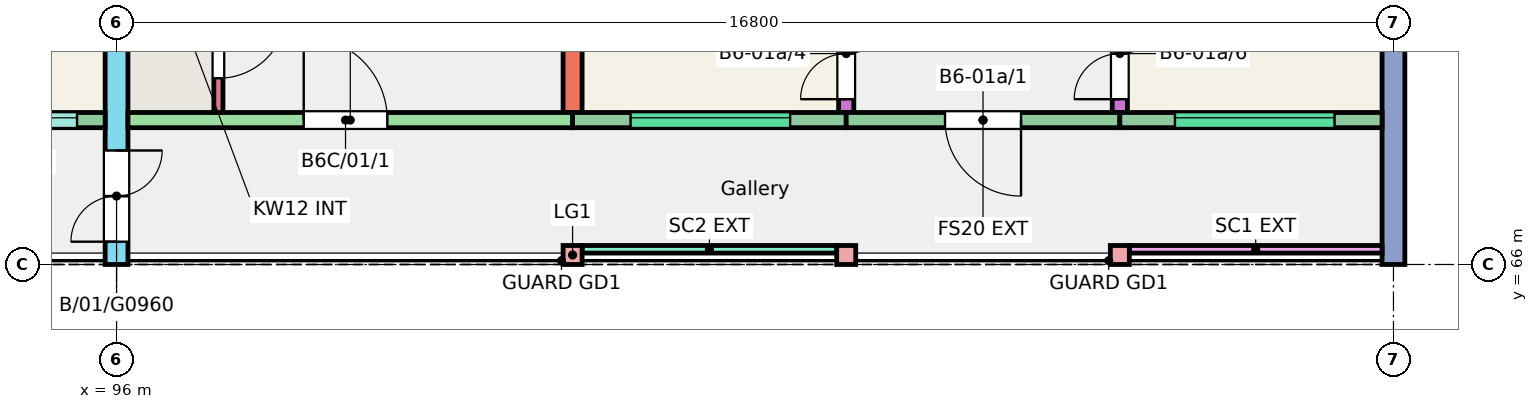
"""IFC4 building model, lengths in metres.
Left out: names, types, materials, properties, quantities, classifications, styles, units other than length and angle.
Written with IfcOpenShell. Run it as: python <this file> out.ifc"""

import sys

from ifc_helpers import new_model, si_unit, direction, frame, frame_2d, origin, origin_2d, place, context, subcontext, project, spatial, rectangle, extrude, element, fill, save


model = new_model("IFC4")
c1 = context("Model", 3, precision=1e-05, world=origin(), true_north=direction((0.0, 1.0)))
c2 = subcontext(c1, "Body", "Model", "MODEL_VIEW")
j1 = project(units=[si_unit("LENGTHUNIT", "METRE"), si_unit("PLANEANGLEUNIT", "RADIAN")], contexts=[c1])
p1 = place(None, origin())
s1 = spatial("IfcSite", under=j1, at=p1, CompositionType="ELEMENT")
p2 = place(p1, origin())
s2 = spatial("IfcBuilding", under=s1, at=p2, CompositionType="ELEMENT")
p3 = place(p2, frame((0.0, 0.0, 3.0)))
s3 = spatial("IfcBuildingStorey", under=s2, at=p3, CompositionType="ELEMENT", Elevation=3.0)
p4 = place(p3, frame((96.0, 66.0, 0.0), z_axis=(0.0, 0.0, 1.0), x_axis=(0.0, 1.0, 0.0)))
e1 = element("IfcWall", 1, at=p4, inside=s3, PredefinedType="SHEAR", context=c2, shape_type="SweptSolid", body=[
    extrude(rectangle(XDim=11.0, YDim=0.3, at=frame_2d((5.5, 0.0))), origin(), (0.0, 0.0, 1.0), 3.0),
])
p5 = place(p4, frame((0.3, 0.0, 0.0)))
e2 = element("IfcOpeningElement", 2, at=p5, cuts=e1, PredefinedType="OPENING", context=c2, shape_type="SweptSolid", body=[
    extrude(rectangle(XDim=1.2, YDim=2.1, at=frame_2d((0.6, 1.05))), frame((0.0, 0.16, 0.0), z_axis=(0.0, -1.0, 0.0), x_axis=(1.0, 0.0, 0.0)), (0.0, 0.0, 1.0), 0.32),
])
p6 = place(p3, frame((102.0, 68.0, 0.0), z_axis=(0.0, 0.0, 1.0), x_axis=(0.0, 1.0, 0.0)))
e3 = element("IfcWall", 3, at=p6, inside=s3, PredefinedType="SHEAR", context=c2, shape_type="SweptSolid", body=[
    extrude(rectangle(XDim=9.0, YDim=0.25, at=frame_2d((4.5, 0.0))), origin(), (0.0, 0.0, 1.0), 3.0),
])
p7 = place(p3, frame((105.6, 68.0, 0.0), z_axis=(0.0, 0.0, 1.0), x_axis=(0.0, 1.0, 0.0)))
e4 = element("IfcWall", 4, at=p7, inside=s3, PredefinedType="SHEAR", context=c2, shape_type="SweptSolid", body=[
    extrude(rectangle(XDim=9.0, YDim=0.2, at=frame_2d((4.5, 0.0))), origin(), (0.0, 0.0, 1.0), 3.0),
])
p8 = place(p7, frame((0.175, 0.0, 0.0)))
e5 = element("IfcOpeningElement", 5, at=p8, cuts=e4, PredefinedType="OPENING", context=c2, shape_type="SweptSolid", body=[
    extrude(rectangle(XDim=1.2, YDim=2.1, at=frame_2d((0.6, 1.05))), frame((0.0, 0.11, 0.0), z_axis=(0.0, -1.0, 0.0), x_axis=(1.0, 0.0, 0.0)), (0.0, 0.0, 1.0), 0.22),
])
p9 = place(p7, frame((6.4, 0.0, 0.0)))
e6 = element("IfcOpeningElement", 6, at=p9, cuts=e4, PredefinedType="OPENING", context=c2, shape_type="SweptSolid", body=[
    extrude(rectangle(XDim=1.2, YDim=2.1, at=frame_2d((0.6, 1.05))), frame((0.0, 0.11, 0.0), z_axis=(0.0, -1.0, 0.0), x_axis=(1.0, 0.0, 0.0)), (0.0, 0.0, 1.0), 0.22),
])
p10 = place(p3, frame((109.2, 68.0, 0.0), z_axis=(0.0, 0.0, 1.0), x_axis=(0.0, 1.0, 0.0)))
e7 = element("IfcWall", 7, at=p10, inside=s3, PredefinedType="SHEAR", context=c2, shape_type="SweptSolid", body=[
    extrude(rectangle(XDim=9.0, YDim=0.2, at=frame_2d((4.5, 0.0))), origin(), (0.0, 0.0, 1.0), 3.0),
])
p11 = place(p10, frame((0.175, 0.0, 0.0)))
e8 = element("IfcOpeningElement", 8, at=p11, cuts=e7, PredefinedType="OPENING", context=c2, shape_type="SweptSolid", body=[
    extrude(rectangle(XDim=1.2, YDim=2.1, at=frame_2d((0.6, 1.05))), frame((0.0, 0.11, 0.0), z_axis=(0.0, -1.0, 0.0), x_axis=(1.0, 0.0, 0.0)), (0.0, 0.0, 1.0), 0.22),
])
p12 = place(p10, frame((6.4, 0.0, 0.0)))
e9 = element("IfcOpeningElement", 9, at=p12, cuts=e7, PredefinedType="OPENING", context=c2, shape_type="SweptSolid", body=[
    extrude(rectangle(XDim=1.2, YDim=2.1, at=frame_2d((0.6, 1.05))), frame((0.0, 0.11, 0.0), z_axis=(0.0, -1.0, 0.0), x_axis=(1.0, 0.0, 0.0)), (0.0, 0.0, 1.0), 0.22),
])
p13 = place(p3, frame((112.8, 66.0, 0.0), z_axis=(0.0, 0.0, 1.0), x_axis=(0.0, 1.0, 0.0)))
e10 = element("IfcWall", 10, at=p13, inside=s3, PredefinedType="SHEAR", context=c2, shape_type="SweptSolid", body=[
    extrude(rectangle(XDim=11.0, YDim=0.3, at=frame_2d((5.5, 0.0))), origin(), (0.0, 0.0, 1.0), 3.0),
])
p14 = place(p13, frame((3.55, 0.0, 0.9)))
e11 = element("IfcOpeningElement", 11, at=p14, cuts=e10, PredefinedType="OPENING", context=c2, shape_type="SweptSolid", body=[
    extrude(rectangle(XDim=1.5, YDim=1.5, at=frame_2d((0.75, 0.75))), frame((0.0, 0.16, 0.0), z_axis=(0.0, -1.0, 0.0), x_axis=(1.0, 0.0, 0.0)), (0.0, 0.0, 1.0), 0.32),
])
p15 = place(p13, frame((8.105, 0.0, 0.9)))
e12 = element("IfcOpeningElement", 12, at=p15, cuts=e10, PredefinedType="OPENING", context=c2, shape_type="SweptSolid", body=[
    extrude(rectangle(XDim=1.5, YDim=1.5, at=frame_2d((0.75, 0.75))), frame((0.0, 0.16, 0.0), z_axis=(0.0, -1.0, 0.0), x_axis=(1.0, 0.0, 0.0)), (0.0, 0.0, 1.0), 0.32),
])
p16 = place(p3, frame((92.4, 67.9, 0.0), z_axis=(0.0, 0.0, 1.0), x_axis=(1.0, 0.0, 0.0)))
e13 = element("IfcWall", 13, at=p16, inside=s3, PredefinedType="SOLIDWALL", context=c2, shape_type="SweptSolid", body=[
    extrude(rectangle(XDim=3.45, YDim=0.2, at=frame_2d((1.725, 0.0))), origin(), (0.0, 0.0, 1.0), 3.0),
])
p17 = place(p16, frame((1.88, 0.0, 1.1)))
e14 = element("IfcOpeningElement", 14, at=p17, cuts=e13, PredefinedType="OPENING", context=c2, shape_type="SweptSolid", body=[
    extrude(rectangle(XDim=1.2, YDim=1.3, at=frame_2d((0.6, 0.65))), frame((0.0, 0.11, 0.0), z_axis=(0.0, -1.0, 0.0), x_axis=(1.0, 0.0, 0.0)), (0.0, 0.0, 1.0), 0.22),
])
p18 = place(p16, frame((0.25, 0.0, 0.0)))
e15 = element("IfcOpeningElement", 15, at=p18, cuts=e13, PredefinedType="OPENING", context=c2, shape_type="SweptSolid", body=[
    extrude(rectangle(XDim=1.0, YDim=2.1, at=frame_2d((0.5, 1.05))), frame((0.0, 0.11, 0.0), z_axis=(0.0, -1.0, 0.0), x_axis=(1.0, 0.0, 0.0)), (0.0, 0.0, 1.0), 0.22),
])
p19 = place(p3, frame((96.15, 67.9, 0.0), z_axis=(0.0, 0.0, 1.0), x_axis=(1.0, 0.0, 0.0)))
e16 = element("IfcWall", 16, at=p19, inside=s3, PredefinedType="SHEAR", context=c2, shape_type="SweptSolid", body=[
    extrude(rectangle(XDim=5.85, YDim=0.2, at=frame_2d((2.925, 0.0))), origin(), (0.0, 0.0, 1.0), 3.0),
])
p20 = place(p19, frame((2.312, 0.0, 0.0)))
e17 = element("IfcOpeningElement", 17, at=p20, cuts=e16, PredefinedType="OPENING", context=c2, shape_type="SweptSolid", body=[
    extrude(rectangle(XDim=1.1, YDim=2.1, at=frame_2d((0.55, 1.05))), frame((0.0, 0.11, 0.0), z_axis=(0.0, -1.0, 0.0), x_axis=(1.0, 0.0, 0.0)), (0.0, 0.0, 1.0), 0.22),
])
p21 = place(p3, frame((97.34, 68.0, 0.0), z_axis=(0.0, 0.0, 1.0), x_axis=(0.0, 1.0, 0.0)))
e18 = element("IfcWall", 18, at=p21, inside=s3, PredefinedType="SHEAR", context=c2, shape_type="SweptSolid", body=[
    extrude(rectangle(XDim=1.72, YDim=0.12, at=frame_2d((0.86, 0.0))), origin(), (0.0, 0.0, 1.0), 3.0),
])
p22 = place(p21, frame((0.45, 0.0, 0.0)))
e19 = element("IfcOpeningElement", 19, at=p22, cuts=e18, PredefinedType="OPENING", context=c2, shape_type="SweptSolid", body=[
    extrude(rectangle(XDim=0.9, YDim=2.1, at=frame_2d((0.45, 1.05))), frame((0.0, 0.07, 0.0), z_axis=(0.0, -1.0, 0.0), x_axis=(1.0, 0.0, 0.0)), (0.0, 0.0, 1.0), 0.14),
])
p23 = place(p3, frame((102.0, 67.9, 0.0), z_axis=(0.0, 0.0, 1.0), x_axis=(1.0, 0.0, 0.0)))
e20 = element("IfcWall", 20, at=p23, inside=s3, PredefinedType="SOLIDWALL", context=c2, shape_type="SweptSolid", body=[
    extrude(rectangle(XDim=3.6, YDim=0.2, at=frame_2d((1.8, 0.0))), origin(), (0.0, 0.0, 1.0), 3.0),
])
p24 = place(p23, frame((0.762, 0.0, 1.2)))
e21 = element("IfcOpeningElement", 21, at=p24, cuts=e20, PredefinedType="OPENING", context=c2, shape_type="SweptSolid", body=[
    extrude(rectangle(XDim=2.1, YDim=1.2, at=frame_2d((1.05, 0.6))), frame((0.0, 0.11, 0.0), z_axis=(0.0, -1.0, 0.0), x_axis=(1.0, 0.0, 0.0)), (0.0, 0.0, 1.0), 0.22),
])
p25 = place(p3, frame((105.6, 67.9, 0.0), z_axis=(0.0, 0.0, 1.0), x_axis=(1.0, 0.0, 0.0)))
e22 = element("IfcWall", 22, at=p25, inside=s3, PredefinedType="SOLIDWALL", context=c2, shape_type="SweptSolid", body=[
    extrude(rectangle(XDim=3.6, YDim=0.2, at=frame_2d((1.8, 0.0))), origin(), (0.0, 0.0, 1.0), 3.0),
])
p26 = place(p25, frame((1.3, 0.0, 0.0)))
e23 = element("IfcOpeningElement", 23, at=p26, cuts=e22, PredefinedType="OPENING", context=c2, shape_type="SweptSolid", body=[
    extrude(rectangle(XDim=1.0, YDim=2.1, at=frame_2d((0.5, 1.05))), frame((0.0, 0.11, 0.0), z_axis=(0.0, -1.0, 0.0), x_axis=(1.0, 0.0, 0.0)), (0.0, 0.0, 1.0), 0.22),
])
p27 = place(p3, frame((109.2, 67.9, 0.0), z_axis=(0.0, 0.0, 1.0), x_axis=(1.0, 0.0, 0.0)))
e24 = element("IfcWall", 24, at=p27, inside=s3, PredefinedType="SOLIDWALL", context=c2, shape_type="SweptSolid", body=[
    extrude(rectangle(XDim=3.45, YDim=0.2, at=frame_2d((1.725, 0.0))), origin(), (0.0, 0.0, 1.0), 3.0),
])
p28 = place(p27, frame((0.725, 0.0, 1.2)))
e25 = element("IfcOpeningElement", 25, at=p28, cuts=e24, PredefinedType="OPENING", context=c2, shape_type="SweptSolid", body=[
    extrude(rectangle(XDim=2.1, YDim=1.2, at=frame_2d((1.05, 0.6))), frame((0.0, 0.11, 0.0), z_axis=(0.0, -1.0, 0.0), x_axis=(1.0, 0.0, 0.0)), (0.0, 0.0, 1.0), 0.22),
])
for number, where, z_axis, x_axis in (
    (26, (102.0, 66.125, 0.0), (0.0, 0.0, 1.0), (1.0, 0.0, 0.0)),
    (27, (105.6, 66.125, 0.0), (0.0, 0.0, 1.0), (1.0, 0.0, 0.0)),
    (28, (109.2, 66.125, 0.0), (0.0, 0.0, 1.0), (1.0, 0.0, 0.0)),
):
    element("IfcColumn", number, at=place(p3, frame(where, z_axis=z_axis, x_axis=x_axis)), inside=s3, PredefinedType="COLUMN", context=c2, shape_type="SweptSolid", body=[
        extrude(rectangle(XDim=0.25, YDim=0.25, at=origin_2d()), origin(), (0.0, 0.0, 1.0), 3.0),
    ])
p29 = place(p3, frame((102.125, 66.2, 0.0), z_axis=(0.0, 0.0, 1.0), x_axis=(1.0, 0.0, 0.0)))
e29 = element("IfcWall", 29, at=p29, inside=s3, PredefinedType="SOLIDWALL", context=c2, shape_type="SweptSolid", body=[
    extrude(rectangle(XDim=3.35, YDim=0.1, at=frame_2d((1.675, 0.0))), origin(), (0.0, 0.0, 1.0), 2.45),
])
p30 = place(p3, frame((109.325, 66.2, 0.0), z_axis=(0.0, 0.0, 1.0), x_axis=(1.0, 0.0, 0.0)))
e30 = element("IfcWall", 30, at=p30, inside=s3, PredefinedType="SOLIDWALL", context=c2, shape_type="SweptSolid", body=[
    extrude(rectangle(XDim=3.325, YDim=0.1, at=frame_2d((1.663, 0.0))), origin(), (0.0, 0.0, 1.0), 2.45),
])
p31 = place(p17, origin())
e31 = element("IfcWindow", 31, at=p31, inside=s3, PartitioningType="SINGLE_PANEL", PredefinedType="WINDOW", context=c2, shape_type="SweptSolid", body=[
    extrude(rectangle(XDim=1.2, YDim=1.3, at=frame_2d((0.6, 0.65))), frame((0.0, 0.06, 0.0), z_axis=(0.0, -1.0, 0.0), x_axis=(1.0, 0.0, 0.0)), (0.0, 0.0, 1.0), 0.06),
])
fill(e14, e31)
p32 = place(p24, origin())
e32 = element("IfcWindow", 32, at=p32, inside=s3, PartitioningType="SINGLE_PANEL", PredefinedType="WINDOW", context=c2, shape_type="SweptSolid", body=[
    extrude(rectangle(XDim=2.1, YDim=1.2, at=frame_2d((1.05, 0.6))), frame((0.0, 0.06, 0.0), z_axis=(0.0, -1.0, 0.0), x_axis=(1.0, 0.0, 0.0)), (0.0, 0.0, 1.0), 0.06),
])
fill(e21, e32)
p33 = place(p28, origin())
e33 = element("IfcWindow", 33, at=p33, inside=s3, PartitioningType="SINGLE_PANEL", PredefinedType="WINDOW", context=c2, shape_type="SweptSolid", body=[
    extrude(rectangle(XDim=2.1, YDim=1.2, at=frame_2d((1.05, 0.6))), frame((0.0, 0.06, 0.0), z_axis=(0.0, -1.0, 0.0), x_axis=(1.0, 0.0, 0.0)), (0.0, 0.0, 1.0), 0.06),
])
fill(e25, e33)
p34 = place(p26, origin())
e34 = element("IfcDoor", 34, at=p34, inside=s3, OperationType="SINGLE_SWING_RIGHT", PredefinedType="DOOR", context=c2, shape_type="SweptSolid", body=[
    extrude(rectangle(XDim=1.0, YDim=2.1, at=frame_2d((0.5, 1.05))), frame((0.0, 0.025, 0.0), z_axis=(0.0, -1.0, 0.0), x_axis=(1.0, 0.0, 0.0)), (0.0, 0.0, 1.0), 0.05),
])
fill(e23, e34)
p35 = place(p8, origin())
e35 = element("IfcDoor", 35, at=p35, inside=s3, OperationType="DOUBLE_DOOR_SINGLE_SWING", PredefinedType="DOOR", context=c2, shape_type="SweptSolid", body=[
    extrude(rectangle(XDim=1.2, YDim=2.1, at=frame_2d((0.6, 1.05))), frame((0.0, 0.025, 0.0), z_axis=(0.0, -1.0, 0.0), x_axis=(1.0, 0.0, 0.0)), (0.0, 0.0, 1.0), 0.05),
])
fill(e5, e35)
p36 = place(p11, origin())
e36 = element("IfcDoor", 36, at=p36, inside=s3, OperationType="DOUBLE_DOOR_SINGLE_SWING", PredefinedType="DOOR", context=c2, shape_type="SweptSolid", body=[
    extrude(rectangle(XDim=1.2, YDim=2.1, at=frame_2d((0.6, 1.05))), frame((0.0, 0.025, 0.0), z_axis=(0.0, -1.0, 0.0), x_axis=(1.0, 0.0, 0.0)), (0.0, 0.0, 1.0), 0.05),
])
fill(e8, e36)
p37 = place(p20, origin())
e37 = element("IfcDoor", 37, at=p37, inside=s3, OperationType="SINGLE_SWING_LEFT", PredefinedType="DOOR", context=c2, shape_type="SweptSolid", body=[
    extrude(rectangle(XDim=1.1, YDim=2.1, at=frame_2d((0.55, 1.05))), frame((0.0, 0.025, 0.0), z_axis=(0.0, -1.0, 0.0), x_axis=(1.0, 0.0, 0.0)), (0.0, 0.0, 1.0), 0.05),
])
fill(e17, e37)
p38 = place(p22, origin())
e38 = element("IfcDoor", 38, at=p38, inside=s3, OperationType="SINGLE_SWING_RIGHT", PredefinedType="DOOR", context=c2, shape_type="SweptSolid", body=[
    extrude(rectangle(XDim=0.9, YDim=2.1, at=frame_2d((0.45, 1.05))), frame((0.0, 0.025, 0.0), z_axis=(0.0, -1.0, 0.0), x_axis=(1.0, 0.0, 0.0)), (0.0, 0.0, 1.0), 0.05),
])
fill(e19, e38)
p39 = place(p5, origin())
e39 = element("IfcDoor", 39, at=p39, inside=s3, OperationType="DOUBLE_DOOR_SINGLE_SWING", PredefinedType="DOOR", context=c2, shape_type="SweptSolid", body=[
    extrude(rectangle(XDim=1.2, YDim=2.1, at=frame_2d((0.6, 1.05))), frame((0.0, 0.025, 0.0), z_axis=(0.0, -1.0, 0.0), x_axis=(1.0, 0.0, 0.0)), (0.0, 0.0, 1.0), 0.05),
])
fill(e2, e39)
save(model, sys.argv[1])
